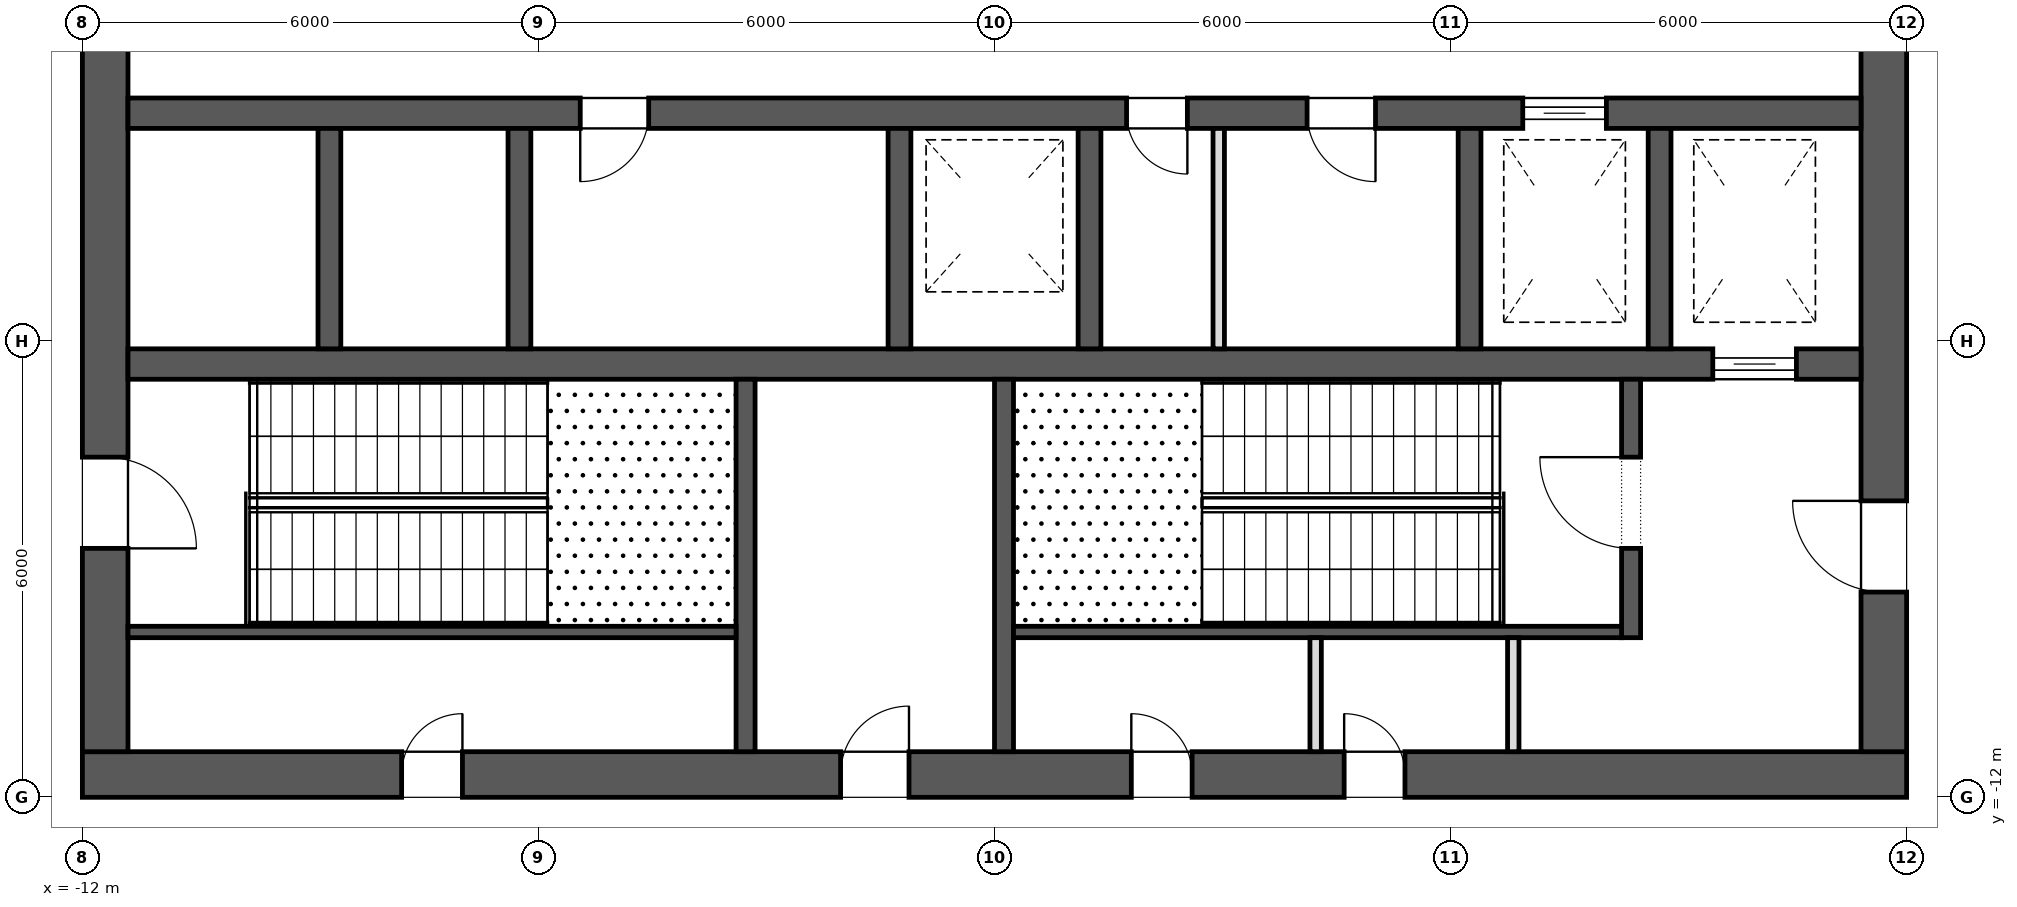
"""IFC4 building model, lengths in metres.
Left out: names, types, materials, properties, quantities, classifications, styles, units other than length and angle.
Written with IfcOpenShell. Run it as: python <this file> out.ifc"""

import sys

from ifc_helpers import new_model, si_unit, direction, frame, frame_2d, origin, place, context, subcontext, project, spatial, rectangle, extrude, element, fill, save


model = new_model("IFC4")
c1 = context("Model", 3, precision=1e-05, world=origin(), true_north=direction((0.0, 1.0)))
c2 = subcontext(c1, "Body", "Model", "MODEL_VIEW")
j1 = project(units=[si_unit("LENGTHUNIT", "METRE"), si_unit("PLANEANGLEUNIT", "RADIAN")], contexts=[c1])
p1 = place(None, origin())
s1 = spatial("IfcSite", under=j1, at=p1, CompositionType="ELEMENT")
p2 = place(p1, origin())
s2 = spatial("IfcBuilding", under=s1, at=p2, CompositionType="ELEMENT")
p3 = place(p2, frame((0.0, 0.0, 338.3)))
s3 = spatial("IfcBuildingStorey", under=s2, at=p3, CompositionType="ELEMENT", Elevation=338.3)
p4 = place(p3, frame((-12.0, -11.7, 0.0), z_axis=(0.0, 0.0, 1.0), x_axis=(1.0, 0.0, 0.0)))
e1 = element("IfcWall", 1, at=p4, inside=s3, PredefinedType="SHEAR", context=c2, shape_type="SweptSolid", body=[
    extrude(rectangle(XDim=24.0, YDim=0.6, at=frame_2d((12.0, 0.0))), origin(), (0.0, 0.0, 1.0), 5.0),
])
p5 = place(p4, frame((9.975, 0.0, 0.0)))
e2 = element("IfcOpeningElement", 2, at=p5, cuts=e1, PredefinedType="OPENING", context=c2, shape_type="SweptSolid", body=[
    extrude(rectangle(XDim=0.9, YDim=2.1, at=frame_2d((0.45, 1.05))), frame((0.0, 0.312, 0.0), z_axis=(0.0, -1.0, 0.0), x_axis=(1.0, 0.0, 0.0)), (0.0, 0.0, 1.0), 0.624),
])
p6 = place(p4, frame((4.2, 0.0, 0.0)))
e3 = element("IfcOpeningElement", 3, at=p6, cuts=e1, PredefinedType="OPENING", context=c2, shape_type="SweptSolid", body=[
    extrude(rectangle(XDim=0.8, YDim=2.1, at=frame_2d((0.4, 1.05))), frame((0.0, 0.312, 0.0), z_axis=(0.0, -1.0, 0.0), x_axis=(1.0, 0.0, 0.0)), (0.0, 0.0, 1.0), 0.624),
])
p7 = place(p4, frame((13.8, 0.0, 0.0)))
e4 = element("IfcOpeningElement", 4, at=p7, cuts=e1, PredefinedType="OPENING", context=c2, shape_type="SweptSolid", body=[
    extrude(rectangle(XDim=0.8, YDim=2.1, at=frame_2d((0.4, 1.05))), frame((0.0, 0.312, 0.0), z_axis=(0.0, -1.0, 0.0), x_axis=(1.0, 0.0, 0.0)), (0.0, 0.0, 1.0), 0.624),
])
p8 = place(p4, frame((16.6, 0.0, 0.0)))
e5 = element("IfcOpeningElement", 5, at=p8, cuts=e1, PredefinedType="OPENING", context=c2, shape_type="SweptSolid", body=[
    extrude(rectangle(XDim=0.8, YDim=2.1, at=frame_2d((0.4, 1.05))), frame((0.0, 0.312, 0.0), z_axis=(0.0, -1.0, 0.0), x_axis=(1.0, 0.0, 0.0)), (0.0, 0.0, 1.0), 0.624),
])
p9 = place(p3, frame((11.7, -11.4, 0.0), z_axis=(0.0, 0.0, 1.0), x_axis=(0.0, 1.0, 0.0)))
e6 = element("IfcWall", 6, at=p9, inside=s3, PredefinedType="SHEAR", context=c2, shape_type="SweptSolid", body=[
    extrude(rectangle(XDim=22.8, YDim=0.6, at=frame_2d((11.4, 0.0))), origin(), (0.0, 0.0, 1.0), 5.0),
])
p10 = place(p9, frame((10.2, 0.0, 0.0)))
e7 = element("IfcOpeningElement", 7, at=p10, cuts=e6, PredefinedType="OPENING", context=c2, shape_type="SweptSolid", body=[
    extrude(rectangle(XDim=2.4, YDim=2.1, at=frame_2d((1.2, 1.05))), frame((0.0, 0.312, 0.0), z_axis=(0.0, -1.0, 0.0), x_axis=(1.0, 0.0, 0.0)), (0.0, 0.0, 1.0), 0.624),
])
p11 = place(p9, frame((19.5, 0.0, 0.0)))
e8 = element("IfcOpeningElement", 8, at=p11, cuts=e6, PredefinedType="OPENING", context=c2, shape_type="SweptSolid", body=[
    extrude(rectangle(XDim=1.2, YDim=2.1, at=frame_2d((0.6, 1.05))), frame((0.0, 0.312, 0.0), z_axis=(0.0, -1.0, 0.0), x_axis=(1.0, 0.0, 0.0)), (0.0, 0.0, 1.0), 0.624),
])
p12 = place(p9, frame((2.1, 0.0, 0.0)))
e9 = element("IfcOpeningElement", 9, at=p12, cuts=e6, PredefinedType="OPENING", context=c2, shape_type="SweptSolid", body=[
    extrude(rectangle(XDim=1.2, YDim=2.1, at=frame_2d((0.6, 1.05))), frame((0.0, 0.312, 0.0), z_axis=(0.0, -1.0, 0.0), x_axis=(1.0, 0.0, 0.0)), (0.0, 0.0, 1.0), 0.624),
])
p13 = place(p3, frame((-11.7, -11.4, 0.0), z_axis=(0.0, 0.0, 1.0), x_axis=(0.0, 1.0, 0.0)))
e10 = element("IfcWall", 10, at=p13, inside=s3, PredefinedType="SHEAR", context=c2, shape_type="SweptSolid", body=[
    extrude(rectangle(XDim=22.8, YDim=0.6, at=frame_2d((11.4, 0.0))), origin(), (0.0, 0.0, 1.0), 5.0),
])
p14 = place(p13, frame((10.2, 0.0, 0.0)))
e11 = element("IfcOpeningElement", 11, at=p14, cuts=e10, PredefinedType="OPENING", context=c2, shape_type="SweptSolid", body=[
    extrude(rectangle(XDim=2.4, YDim=2.1, at=frame_2d((1.2, 1.05))), frame((0.0, 0.312, 0.0), z_axis=(0.0, -1.0, 0.0), x_axis=(1.0, 0.0, 0.0)), (0.0, 0.0, 1.0), 0.624),
])
p15 = place(p13, frame((18.925, 0.0, 0.0)))
e12 = element("IfcOpeningElement", 12, at=p15, cuts=e10, PredefinedType="OPENING", context=c2, shape_type="SweptSolid", body=[
    extrude(rectangle(XDim=1.2, YDim=2.1, at=frame_2d((0.6, 1.05))), frame((0.0, 0.312, 0.0), z_axis=(0.0, -1.0, 0.0), x_axis=(1.0, 0.0, 0.0)), (0.0, 0.0, 1.0), 0.624),
])
p16 = place(p13, frame((2.675, 0.0, 0.0)))
e13 = element("IfcOpeningElement", 13, at=p16, cuts=e10, PredefinedType="OPENING", context=c2, shape_type="SweptSolid", body=[
    extrude(rectangle(XDim=1.2, YDim=2.1, at=frame_2d((0.6, 1.05))), frame((0.0, 0.312, 0.0), z_axis=(0.0, -1.0, 0.0), x_axis=(1.0, 0.0, 0.0)), (0.0, 0.0, 1.0), 0.624),
])
p17 = place(p3, frame((-11.4, -3.0, 0.0), z_axis=(0.0, 0.0, 1.0), x_axis=(1.0, 0.0, 0.0)))
e14 = element("IfcWall", 14, at=p17, inside=s3, PredefinedType="SHEAR", context=c2, shape_type="SweptSolid", body=[
    extrude(rectangle(XDim=22.8, YDim=0.4, at=frame_2d((11.4, 0.0))), origin(), (0.0, 0.0, 1.0), 5.0),
])
p18 = place(p17, frame((18.35, 0.0, 0.0)))
e15 = element("IfcOpeningElement", 15, at=p18, cuts=e14, PredefinedType="OPENING", context=c2, shape_type="SweptSolid", body=[
    extrude(rectangle(XDim=1.1, YDim=2.1, at=frame_2d((0.55, 1.05))), frame((0.0, 0.212, 0.0), z_axis=(0.0, -1.0, 0.0), x_axis=(1.0, 0.0, 0.0)), (0.0, 0.0, 1.0), 0.424),
])
p19 = place(p17, frame((13.137, 0.0, 0.0)))
e16 = element("IfcOpeningElement", 16, at=p19, cuts=e14, PredefinedType="OPENING", context=c2, shape_type="SweptSolid", body=[
    extrude(rectangle(XDim=0.8, YDim=2.1, at=frame_2d((0.4, 1.05))), frame((0.0, 0.212, 0.0), z_axis=(0.0, -1.0, 0.0), x_axis=(1.0, 0.0, 0.0)), (0.0, 0.0, 1.0), 0.424),
])
p20 = place(p17, frame((15.512, 0.0, 0.0)))
e17 = element("IfcOpeningElement", 17, at=p20, cuts=e14, PredefinedType="OPENING", context=c2, shape_type="SweptSolid", body=[
    extrude(rectangle(XDim=0.9, YDim=2.1, at=frame_2d((0.45, 1.05))), frame((0.0, 0.212, 0.0), z_axis=(0.0, -1.0, 0.0), x_axis=(1.0, 0.0, 0.0)), (0.0, 0.0, 1.0), 0.424),
])
p21 = place(p17, frame((5.95, 0.0, 0.0)))
e18 = element("IfcOpeningElement", 18, at=p21, cuts=e14, PredefinedType="OPENING", context=c2, shape_type="SweptSolid", body=[
    extrude(rectangle(XDim=0.9, YDim=2.1, at=frame_2d((0.45, 1.05))), frame((0.0, 0.212, 0.0), z_axis=(0.0, -1.0, 0.0), x_axis=(1.0, 0.0, 0.0)), (0.0, 0.0, 1.0), 0.424),
])
p22 = place(p3, frame((-11.4, -6.3, 0.0), z_axis=(0.0, 0.0, 1.0), x_axis=(1.0, 0.0, 0.0)))
e19 = element("IfcWall", 19, at=p22, inside=s3, PredefinedType="SHEAR", context=c2, shape_type="SweptSolid", body=[
    extrude(rectangle(XDim=22.8, YDim=0.4, at=frame_2d((11.4, 0.0))), origin(), (0.0, 0.0, 1.0), 5.0),
])
p23 = place(p22, frame((20.85, 0.0, 0.0)))
e20 = element("IfcOpeningElement", 20, at=p23, cuts=e19, PredefinedType="OPENING", context=c2, shape_type="SweptSolid", body=[
    extrude(rectangle(XDim=1.1, YDim=2.1, at=frame_2d((0.55, 1.05))), frame((0.0, 0.212, 0.0), z_axis=(0.0, -1.0, 0.0), x_axis=(1.0, 0.0, 0.0)), (0.0, 0.0, 1.0), 0.424),
])
for number, where, z_axis, x_axis in (
    (21, (-8.75, -6.1, 0.0), (0.0, 0.0, 1.0), (0.0, 1.0, 0.0)),
    (22, (-6.25, -6.1, 0.0), (0.0, 0.0, 1.0), (0.0, 1.0, 0.0)),
    (23, (-1.25, -6.1, 0.0), (0.0, 0.0, 1.0), (0.0, 1.0, 0.0)),
    (24, (1.25, -6.1, 0.0), (0.0, 0.0, 1.0), (0.0, 1.0, 0.0)),
    (25, (6.25, -6.1, 0.0), (0.0, 0.0, 1.0), (0.0, 1.0, 0.0)),
    (26, (8.75, -6.1, 0.0), (0.0, 0.0, 1.0), (0.0, 1.0, 0.0)),
):
    element("IfcWall", number, at=place(p3, frame(where, z_axis=z_axis, x_axis=x_axis)), inside=s3, PredefinedType="SHEAR", context=c2, shape_type="SweptSolid", body=[
        extrude(rectangle(XDim=2.9, YDim=0.3, at=frame_2d((1.45, 0.0))), origin(), (0.0, 0.0, 1.0), 5.0),
    ])
for number, where, z_axis, x_axis in (
    (27, (-3.275, -11.4, 0.0), (0.0, 0.0, 1.0), (0.0, 1.0, 0.0)),
    (28, (0.125, -11.4, 0.0), (0.0, 0.0, 1.0), (0.0, 1.0, 0.0)),
):
    element("IfcWall", number, at=place(p3, frame(where, z_axis=z_axis, x_axis=x_axis)), inside=s3, PredefinedType="SHEAR", context=c2, shape_type="SweptSolid", body=[
        extrude(rectangle(XDim=4.9, YDim=0.25, at=frame_2d((2.45, 0.0))), origin(), (0.0, 0.0, 1.0), 4.65),
    ])
p24 = place(p3, frame((8.375, -9.9, 0.0), z_axis=(0.0, 0.0, 1.0), x_axis=(0.0, 1.0, 0.0)))
e29 = element("IfcWall", 29, at=p24, inside=s3, PredefinedType="SHEAR", context=c2, shape_type="SweptSolid", body=[
    extrude(rectangle(XDim=3.4, YDim=0.25, at=frame_2d((1.7, 0.0))), origin(), (0.0, 0.0, 1.0), 4.65),
])
p25 = place(p24, frame((1.175, 0.0, 0.0)))
e30 = element("IfcOpeningElement", 30, at=p25, cuts=e29, PredefinedType="OPENING", context=c2, shape_type="SweptSolid", body=[
    extrude(rectangle(XDim=1.2, YDim=2.1, at=frame_2d((0.6, 1.05))), frame((0.0, 0.137, 0.0), z_axis=(0.0, -1.0, 0.0), x_axis=(1.0, 0.0, 0.0)), (0.0, 0.0, 1.0), 0.274),
])
for number, where, z_axis, x_axis in (
    (31, (-11.4, -9.825, 0.0), (0.0, 0.0, 1.0), (1.0, 0.0, 0.0)),
    (32, (0.25, -9.825, 0.0), (0.0, 0.0, 1.0), (1.0, 0.0, 0.0)),
):
    element("IfcWall", number, at=place(p3, frame(where, z_axis=z_axis, x_axis=x_axis)), inside=s3, PredefinedType="SHEAR", context=c2, shape_type="SweptSolid", body=[
        extrude(rectangle(XDim=8.0, YDim=0.15, at=frame_2d((4.0, 0.0))), origin(), (0.0, 0.0, 1.0), 4.65),
    ])
for number, where, z_axis, x_axis in (
    (33, (4.225, -11.4, 0.0), (0.0, 0.0, 1.0), (0.0, 1.0, 0.0)),
    (34, (6.825, -11.4, 0.0), (0.0, 0.0, 1.0), (0.0, 1.0, 0.0)),
):
    element("IfcWall", number, at=place(p3, frame(where, z_axis=z_axis, x_axis=x_axis)), inside=s3, PredefinedType="PARTITIONING", context=c2, shape_type="SweptSolid", body=[
        extrude(rectangle(XDim=1.5, YDim=0.15, at=frame_2d((0.75, 0.0))), origin(), (0.0, 0.0, 1.0), 4.65),
    ])
p26 = place(p3, frame((2.95, -6.1, 0.0), z_axis=(0.0, 0.0, 1.0), x_axis=(0.0, 1.0, 0.0)))
e35 = element("IfcWall", 35, at=p26, inside=s3, PredefinedType="PARTITIONING", context=c2, shape_type="SweptSolid", body=[
    extrude(rectangle(XDim=2.9, YDim=0.15, at=frame_2d((1.45, 0.0))), origin(), (0.0, 0.0, 1.0), 4.65),
])
p27 = place(p23, origin())
e36 = element("IfcDoor", 36, at=p27, inside=s3, OperationType="SLIDING_TO_LEFT", PredefinedType="DOOR", context=c2, shape_type="SweptSolid", body=[
    extrude(rectangle(XDim=1.1, YDim=2.1, at=frame_2d((0.55, 1.05))), frame((0.0, 0.025, 0.0), z_axis=(0.0, -1.0, 0.0), x_axis=(1.0, 0.0, 0.0)), (0.0, 0.0, 1.0), 0.05),
])
fill(e20, e36)
p28 = place(p18, origin())
e37 = element("IfcDoor", 37, at=p28, inside=s3, OperationType="SLIDING_TO_LEFT", PredefinedType="DOOR", context=c2, shape_type="SweptSolid", body=[
    extrude(rectangle(XDim=1.1, YDim=2.1, at=frame_2d((0.55, 1.05))), frame((0.0, 0.025, 0.0), z_axis=(0.0, -1.0, 0.0), x_axis=(1.0, 0.0, 0.0)), (0.0, 0.0, 1.0), 0.05),
])
fill(e15, e37)
p29 = place(p16, frame((1.2, 0.0, 0.0), z_axis=(0.0, 0.0, 1.0), x_axis=(-1.0, 0.0, 0.0)))
e38 = element("IfcDoor", 38, at=p29, inside=s3, OperationType="SINGLE_SWING_LEFT", PredefinedType="DOOR", context=c2, shape_type="SweptSolid", body=[
    extrude(rectangle(XDim=1.2, YDim=2.1, at=frame_2d((0.6, 1.05))), frame((0.0, 0.025, 0.0), z_axis=(0.0, -1.0, 0.0), x_axis=(1.0, 0.0, 0.0)), (0.0, 0.0, 1.0), 0.05),
])
fill(e13, e38)
p30 = place(p25, origin())
e39 = element("IfcDoor", 39, at=p30, inside=s3, OperationType="SINGLE_SWING_LEFT", PredefinedType="DOOR", context=c2, shape_type="SweptSolid", body=[
    extrude(rectangle(XDim=1.2, YDim=2.1, at=frame_2d((0.6, 1.05))), frame((0.0, 0.025, 0.0), z_axis=(0.0, -1.0, 0.0), x_axis=(1.0, 0.0, 0.0)), (0.0, 0.0, 1.0), 0.05),
])
fill(e30, e39)
p31 = place(p12, origin())
e40 = element("IfcDoor", 40, at=p31, inside=s3, OperationType="SINGLE_SWING_LEFT", PredefinedType="DOOR", context=c2, shape_type="SweptSolid", body=[
    extrude(rectangle(XDim=1.2, YDim=2.1, at=frame_2d((0.6, 1.05))), frame((0.0, 0.025, 0.0), z_axis=(0.0, -1.0, 0.0), x_axis=(1.0, 0.0, 0.0)), (0.0, 0.0, 1.0), 0.05),
])
fill(e9, e40)
p32 = place(p5, origin())
e41 = element("IfcDoor", 41, at=p32, inside=s3, OperationType="SINGLE_SWING_LEFT", PredefinedType="DOOR", context=c2, shape_type="SweptSolid", body=[
    extrude(rectangle(XDim=0.9, YDim=2.1, at=frame_2d((0.45, 1.05))), frame((0.0, 0.025, 0.0), z_axis=(0.0, -1.0, 0.0), x_axis=(1.0, 0.0, 0.0)), (0.0, 0.0, 1.0), 0.05),
])
fill(e2, e41)
p33 = place(p6, origin())
e42 = element("IfcDoor", 42, at=p33, inside=s3, OperationType="SINGLE_SWING_LEFT", PredefinedType="DOOR", context=c2, shape_type="SweptSolid", body=[
    extrude(rectangle(XDim=0.8, YDim=2.1, at=frame_2d((0.4, 1.05))), frame((0.0, 0.025, 0.0), z_axis=(0.0, -1.0, 0.0), x_axis=(1.0, 0.0, 0.0)), (0.0, 0.0, 1.0), 0.05),
])
fill(e3, e42)
p34 = place(p7, origin())
e43 = element("IfcDoor", 43, at=p34, inside=s3, OperationType="SINGLE_SWING_RIGHT", PredefinedType="DOOR", context=c2, shape_type="SweptSolid", body=[
    extrude(rectangle(XDim=0.8, YDim=2.1, at=frame_2d((0.4, 1.05))), frame((0.0, 0.025, 0.0), z_axis=(0.0, -1.0, 0.0), x_axis=(1.0, 0.0, 0.0)), (0.0, 0.0, 1.0), 0.05),
])
fill(e4, e43)
p35 = place(p8, origin())
e44 = element("IfcDoor", 44, at=p35, inside=s3, OperationType="SINGLE_SWING_RIGHT", PredefinedType="DOOR", context=c2, shape_type="SweptSolid", body=[
    extrude(rectangle(XDim=0.8, YDim=2.1, at=frame_2d((0.4, 1.05))), frame((0.0, 0.025, 0.0), z_axis=(0.0, -1.0, 0.0), x_axis=(1.0, 0.0, 0.0)), (0.0, 0.0, 1.0), 0.05),
])
fill(e5, e44)
p36 = place(p19, frame((0.8, 0.0, 0.0), z_axis=(0.0, 0.0, 1.0), x_axis=(-1.0, 0.0, 0.0)))
e45 = element("IfcDoor", 45, at=p36, inside=s3, OperationType="SINGLE_SWING_RIGHT", PredefinedType="DOOR", context=c2, shape_type="SweptSolid", body=[
    extrude(rectangle(XDim=0.8, YDim=2.1, at=frame_2d((0.4, 1.05))), frame((0.0, 0.025, 0.0), z_axis=(0.0, -1.0, 0.0), x_axis=(1.0, 0.0, 0.0)), (0.0, 0.0, 1.0), 0.05),
])
fill(e16, e45)
p37 = place(p20, frame((0.9, 0.0, 0.0), z_axis=(0.0, 0.0, 1.0), x_axis=(-1.0, 0.0, 0.0)))
e46 = element("IfcDoor", 46, at=p37, inside=s3, OperationType="SINGLE_SWING_RIGHT", PredefinedType="DOOR", context=c2, shape_type="SweptSolid", body=[
    extrude(rectangle(XDim=0.9, YDim=2.1, at=frame_2d((0.45, 1.05))), frame((0.0, 0.025, 0.0), z_axis=(0.0, -1.0, 0.0), x_axis=(1.0, 0.0, 0.0)), (0.0, 0.0, 1.0), 0.05),
])
fill(e17, e46)
p38 = place(p21, frame((0.9, 0.0, 0.0), z_axis=(0.0, 0.0, 1.0), x_axis=(-1.0, 0.0, 0.0)))
e47 = element("IfcDoor", 47, at=p38, inside=s3, OperationType="SINGLE_SWING_LEFT", PredefinedType="DOOR", context=c2, shape_type="SweptSolid", body=[
    extrude(rectangle(XDim=0.9, YDim=2.1, at=frame_2d((0.45, 1.05))), frame((0.0, 0.025, 0.0), z_axis=(0.0, -1.0, 0.0), x_axis=(1.0, 0.0, 0.0)), (0.0, 0.0, 1.0), 0.05),
])
fill(e18, e47)
save(model, sys.argv[1])
